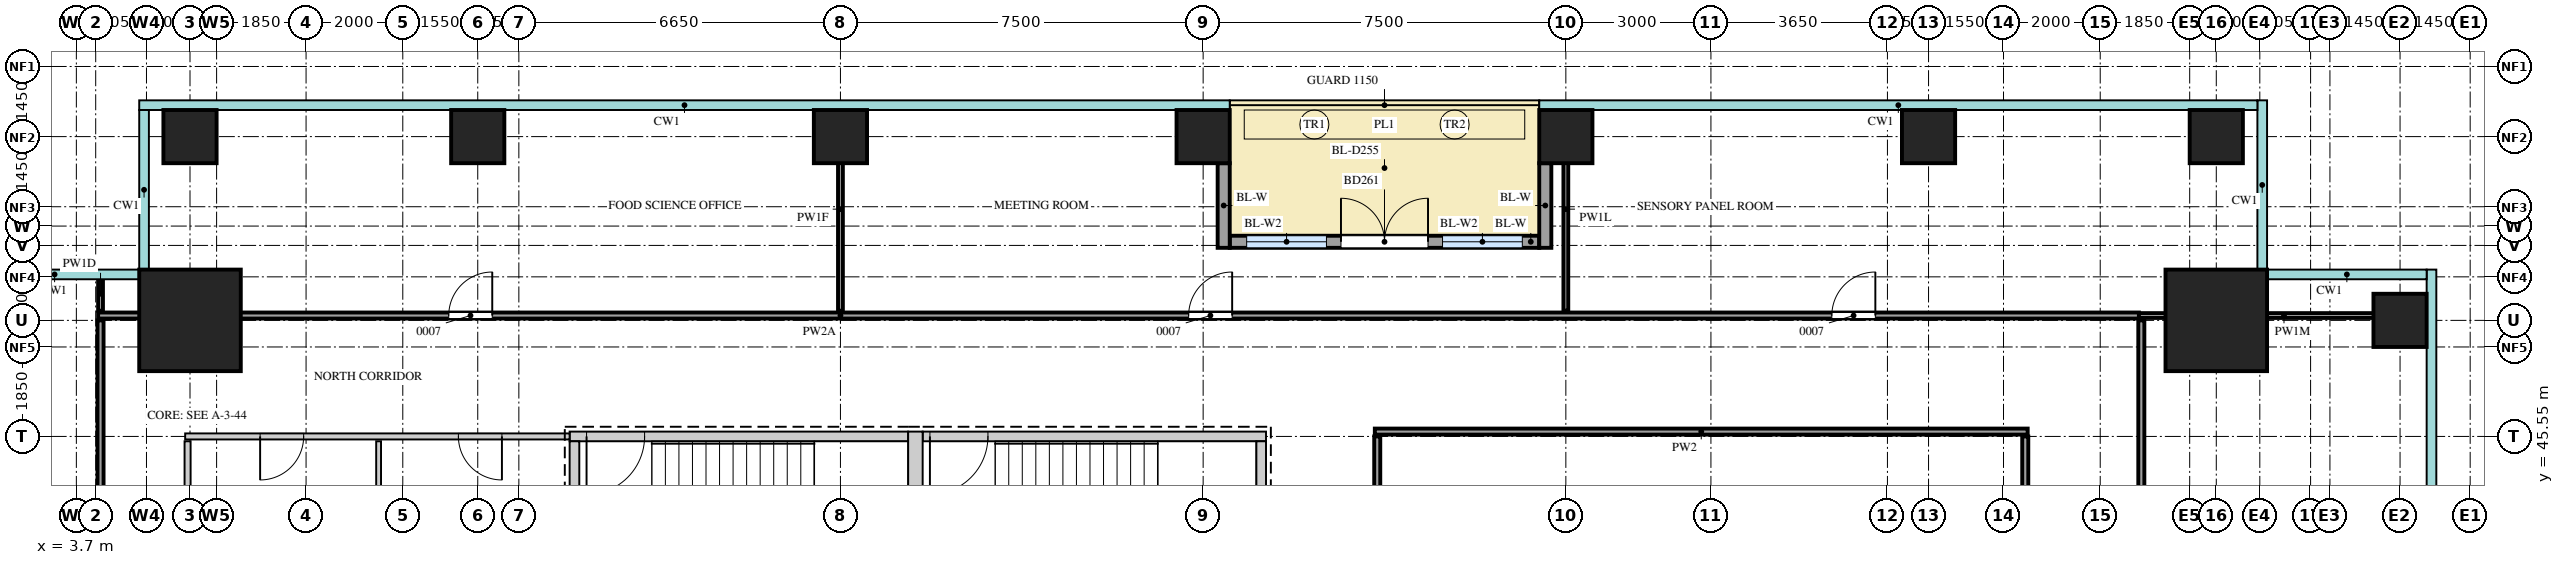
"""IFC4 building model, lengths in metres.
Left out: names, types, materials, properties, quantities, classifications, styles, units other than length and angle.
Written with IfcOpenShell. Run it as: python <this file> out.ifc"""

import sys

from ifc_helpers import new_model, si_unit, direction, frame, frame_2d, origin, origin_2d, place, context, subcontext, project, spatial, rectangle, extrude, source, transform, mapped, element, fill, save


model = new_model("IFC4")
c1 = context("Model", 3, precision=1e-05, world=origin(), true_north=direction((0.0, 1.0)))
c2 = subcontext(c1, "Body", "Model", "MODEL_VIEW")
j1 = project(units=[si_unit("LENGTHUNIT", "METRE"), si_unit("PLANEANGLEUNIT", "RADIAN")], contexts=[c1])
p1 = place(None, origin())
s1 = spatial("IfcSite", under=j1, at=p1, CompositionType="ELEMENT")
p2 = place(p1, origin())
s2 = spatial("IfcBuilding", under=s1, at=p2, CompositionType="ELEMENT")
p3 = place(p2, frame((0.0, 0.0, 123.5)))
s3 = spatial("IfcBuildingStorey", under=s2, at=p3, CompositionType="ELEMENT", Elevation=123.5)
m1 = source(origin(), c2, "Body", "SweptSolid", [
    extrude(rectangle(XDim=7.0, YDim=0.2, at=frame_2d((3.5, 0.0))), origin(), (0.0, 0.0, 1.0), 4.1),
])
p4 = place(p3, frame((13.9, 45.55, 0.0), z_axis=(0.0, 0.0, 1.0), x_axis=(1.0, 0.0, 0.0)))
e1 = element("IfcWall", 1, at=p4, inside=s3, PredefinedType="SHEAR", context=c2, shape_type="MappedRepresentation", body=[
    mapped(m1, transform((0.0, 0.0, 0.0))),
])
m2 = source(origin(), c2, "Body", "SweptSolid", [
    extrude(rectangle(XDim=1.2, YDim=2.1, at=frame_2d((0.6, 1.05))), frame((0.0, 0.11, 0.0), z_axis=(0.0, -1.0, 0.0), x_axis=(1.0, 0.0, 0.0)), (0.0, 0.0, 1.0), 0.22),
])
p5 = place(p4, frame((0.35, 0.0, 0.0)))
e2 = element("IfcOpeningElement", 2, at=p5, cuts=e1, PredefinedType="OPENING", context=c2, shape_type="MappedRepresentation", body=[
    mapped(m2, transform((0.0, 0.0, 0.0))),
])
m3 = source(origin(), c2, "Body", "SweptSolid", [
    extrude(rectangle(XDim=7.1, YDim=0.2, at=frame_2d((3.55, 0.0))), origin(), (0.0, 0.0, 1.0), 4.1),
])
p6 = place(p3, frame((21.2, 45.55, 0.0), z_axis=(0.0, 0.0, 1.0), x_axis=(1.0, 0.0, 0.0)))
e3 = element("IfcWall", 3, at=p6, inside=s3, PredefinedType="SHEAR", context=c2, shape_type="MappedRepresentation", body=[
    mapped(m3, transform((0.0, 0.0, 0.0))),
])
p7 = place(p6, frame((0.15, 0.0, 0.0)))
e4 = element("IfcOpeningElement", 4, at=p7, cuts=e3, PredefinedType="OPENING", context=c2, shape_type="MappedRepresentation", body=[
    mapped(m2, transform((0.0, 0.0, 0.0))),
])
m4 = source(origin(), c2, "Body", "SweptSolid", [
    extrude(rectangle(XDim=3.75, YDim=0.3, at=frame_2d((1.875, 0.0))), origin(), (0.0, 0.0, 1.0), 4.1),
])
p8 = place(p3, frame((21.05, 41.9, 0.0), z_axis=(0.0, 0.0, 1.0), x_axis=(0.0, 1.0, 0.0)))
e5 = element("IfcWall", 5, at=p8, inside=s3, PredefinedType="SHEAR", context=c2, shape_type="MappedRepresentation", body=[
    mapped(m4, transform((0.0, 0.0, 0.0))),
])
m5 = source(origin(), c2, "Body", "SweptSolid", [
    extrude(rectangle(XDim=3.35, YDim=0.2, at=frame_2d((1.675, 0.0))), origin(), (0.0, 0.0, 1.0), 4.1),
])
for number, where, z_axis, x_axis in (
    (6, (14.0, 42.1, 0.0), (0.0, 0.0, 1.0), (0.0, 1.0, 0.0)),
    (7, (28.2, 42.1, 0.0), (0.0, 0.0, 1.0), (0.0, 1.0, 0.0)),
):
    element("IfcWall", number, at=place(p3, frame(where, z_axis=z_axis, x_axis=x_axis)), inside=s3, PredefinedType="SHEAR", context=c2, shape_type="MappedRepresentation", body=[
        mapped(m5, transform((0.0, 0.0, 0.0))),
    ])
m6 = source(origin(), c2, "Body", "SweptSolid", [
    extrude(rectangle(XDim=2.1, YDim=2.1, at=origin_2d()), origin(), (0.0, 0.0, 1.0), 4.4),
])
for number, where, z_axis, x_axis in (
    (8, (47.95, 47.95, 0.0), (0.0, 0.0, 1.0), (1.0, 0.0, 0.0)),
    (9, (6.05, 47.95, 0.0), (0.0, 0.0, 1.0), (1.0, 0.0, 0.0)),
):
    element("IfcColumn", number, at=place(p3, frame(where, z_axis=z_axis, x_axis=x_axis)), inside=s3, PredefinedType="COLUMN", context=c2, shape_type="MappedRepresentation", body=[
        mapped(m6, transform((0.0, 0.0, 0.0))),
    ])
m7 = source(origin(), c2, "Body", "SweptSolid", [
    extrude(rectangle(XDim=1.1, YDim=1.1, at=origin_2d()), origin(), (0.0, 0.0, 1.0), 4.1),
])
for number, where, z_axis, x_axis in (
    (10, (51.75, 47.95, 0.0), (0.0, 0.0, 1.0), (1.0, 0.0, 0.0)),
    (11, (6.05, 51.75, 0.0), (0.0, 0.0, 1.0), (1.0, 0.0, 0.0)),
    (12, (12.0, 51.75, 0.0), (0.0, 0.0, 1.0), (1.0, 0.0, 0.0)),
    (13, (19.5, 51.75, 0.0), (0.0, 0.0, 1.0), (1.0, 0.0, 0.0)),
    (14, (27.0, 51.75, 0.0), (0.0, 0.0, 1.0), (1.0, 0.0, 0.0)),
    (15, (34.5, 51.75, 0.0), (0.0, 0.0, 1.0), (1.0, 0.0, 0.0)),
    (16, (42.0, 51.75, 0.0), (0.0, 0.0, 1.0), (1.0, 0.0, 0.0)),
    (17, (47.95, 51.75, 0.0), (0.0, 0.0, 1.0), (1.0, 0.0, 0.0)),
):
    element("IfcColumn", number, at=place(p3, frame(where, z_axis=z_axis, x_axis=x_axis)), inside=s3, PredefinedType="COLUMN", context=c2, shape_type="MappedRepresentation", body=[
        mapped(m7, transform((0.0, 0.0, 0.0))),
    ])
m8 = source(origin(), c2, "Body", "SweptSolid", [
    extrude(rectangle(XDim=6.4, YDim=0.25, at=frame_2d((3.2, 0.0))), origin(), (0.0, 0.0, 1.0), 4.1),
])
p9 = place(p3, frame((27.55, 49.575, 0.0), z_axis=(0.0, 0.0, 1.0), x_axis=(1.0, 0.0, 0.0)))
e18 = element("IfcWall", 18, at=p9, inside=s3, PredefinedType="SOLIDWALL", context=c2, shape_type="MappedRepresentation", body=[
    mapped(m8, transform((0.0, 0.0, 0.0))),
])
m9 = source(origin(), c2, "Body", "SweptSolid", [
    extrude(rectangle(XDim=1.65, YDim=2.4, at=frame_2d((0.825, 1.2))), frame((0.0, 0.135, 0.0), z_axis=(0.0, -1.0, 0.0), x_axis=(1.0, 0.0, 0.0)), (0.0, 0.0, 1.0), 0.27),
])
p10 = place(p9, frame((0.35, 0.0, 0.0)))
e19 = element("IfcOpeningElement", 19, at=p10, cuts=e18, PredefinedType="OPENING", context=c2, shape_type="MappedRepresentation", body=[
    mapped(m9, transform((0.0, 0.0, 0.0))),
])
p11 = place(p9, frame((4.4, 0.0, 0.0)))
e20 = element("IfcOpeningElement", 20, at=p11, cuts=e18, PredefinedType="OPENING", context=c2, shape_type="MappedRepresentation", body=[
    mapped(m9, transform((0.0, 0.0, 0.0))),
])
m10 = source(origin(), c2, "Body", "SweptSolid", [
    extrude(rectangle(XDim=1.8, YDim=2.4, at=frame_2d((0.9, 1.2))), frame((0.0, 0.135, 0.0), z_axis=(0.0, -1.0, 0.0), x_axis=(1.0, 0.0, 0.0)), (0.0, 0.0, 1.0), 0.27),
])
p12 = place(p9, frame((2.3, 0.0, 0.0)))
e21 = element("IfcOpeningElement", 21, at=p12, cuts=e18, PredefinedType="OPENING", context=c2, shape_type="MappedRepresentation", body=[
    mapped(m10, transform((0.0, 0.0, 0.0))),
])
m11 = source(origin(), c2, "Body", "SweptSolid", [
    extrude(rectangle(XDim=1.75, YDim=0.25, at=frame_2d((0.875, 0.0))), origin(), (0.0, 0.0, 1.0), 4.1),
])
for number, where, z_axis, x_axis in (
    (22, (27.425, 51.2, 0.0), (0.0, 0.0, 1.0), (0.0, -1.0, 0.0)),
    (23, (34.075, 51.2, 0.0), (0.0, 0.0, 1.0), (0.0, -1.0, 0.0)),
):
    element("IfcWall", number, at=place(p3, frame(where, z_axis=z_axis, x_axis=x_axis)), inside=s3, PredefinedType="SOLIDWALL", context=c2, shape_type="MappedRepresentation", body=[
        mapped(m11, transform((0.0, 0.0, 0.0))),
    ])
m12 = source(origin(), c2, "Body", "SweptSolid", [
    extrude(rectangle(XDim=37.65, YDim=0.125, at=frame_2d((18.825, 0.0))), origin(), (0.0, 0.0, 1.0), 4.2),
])
p13 = place(p3, frame((46.4, 10.3, 0.0), z_axis=(0.0, 0.0, 1.0), x_axis=(0.0, 1.0, 0.0)))
e24 = element("IfcWall", 24, at=p13, inside=s3, PredefinedType="PARTITIONING", context=c2, shape_type="MappedRepresentation", body=[
    mapped(m12, transform((0.0, 0.0, 0.0))),
])
m13 = source(origin(), c2, "Body", "SweptSolid", [
    extrude(rectangle(XDim=1.2, YDim=2.1, at=frame_2d((0.6, 1.05))), frame((0.0, 0.073, 0.0), z_axis=(0.0, -1.0, 0.0), x_axis=(1.0, 0.0, 0.0)), (0.0, 0.0, 1.0), 0.145),
])
p14 = place(p13, frame((11.6, 0.0, 0.0)))
e25 = element("IfcOpeningElement", 25, at=p14, cuts=e24, PredefinedType="OPENING", context=c2, shape_type="MappedRepresentation", body=[
    mapped(m13, transform((0.0, 0.0, 0.0))),
])
m14 = source(origin(), c2, "Body", "SweptSolid", [
    extrude(rectangle(XDim=0.9, YDim=2.1, at=frame_2d((0.45, 1.05))), frame((0.0, 0.073, 0.0), z_axis=(0.0, -1.0, 0.0), x_axis=(1.0, 0.0, 0.0)), (0.0, 0.0, 1.0), 0.145),
])
p15 = place(p13, frame((29.45, 0.0, 0.0)))
e26 = element("IfcOpeningElement", 26, at=p15, cuts=e24, PredefinedType="OPENING", context=c2, shape_type="MappedRepresentation", body=[
    mapped(m14, transform((0.0, 0.0, 0.0))),
])
m15 = source(origin(), c2, "Body", "SweptSolid", [
    extrude(rectangle(XDim=32.85, YDim=0.125, at=frame_2d((16.425, 0.0))), origin(), (0.0, 0.0, 1.0), 4.2),
])
p16 = place(p3, frame((44.0, 12.7, 0.0), z_axis=(0.0, 0.0, 1.0), x_axis=(0.0, 1.0, 0.0)))
e27 = element("IfcWall", 27, at=p16, inside=s3, PredefinedType="PARTITIONING", context=c2, shape_type="MappedRepresentation", body=[
    mapped(m15, transform((0.0, 0.0, 0.0))),
])
p17 = place(p16, frame((18.2, 0.0, 0.0)))
e28 = element("IfcOpeningElement", 28, at=p17, cuts=e27, PredefinedType="OPENING", context=c2, shape_type="MappedRepresentation", body=[
    mapped(m13, transform((0.0, 0.0, 0.0))),
])
p18 = place(p16, frame((27.5, 0.0, 0.0)))
e29 = element("IfcOpeningElement", 29, at=p18, cuts=e27, PredefinedType="OPENING", context=c2, shape_type="MappedRepresentation", body=[
    mapped(m13, transform((0.0, 0.0, 0.0))),
])
m16 = source(origin(), c2, "Body", "SweptSolid", [
    extrude(rectangle(XDim=28.75, YDim=0.125, at=frame_2d((14.375, 0.0))), origin(), (0.0, 0.0, 1.0), 4.2),
])
p19 = place(p3, frame((4.2, 19.2, 0.0), z_axis=(0.0, 0.0, 1.0), x_axis=(0.0, 1.0, 0.0)))
e30 = element("IfcWall", 30, at=p19, inside=s3, PredefinedType="PARTITIONING", context=c2, shape_type="MappedRepresentation", body=[
    mapped(m16, transform((0.0, 0.0, 0.0))),
])
p20 = place(p19, frame((3.45, 0.0, 0.0)))
e31 = element("IfcOpeningElement", 31, at=p20, cuts=e30, PredefinedType="OPENING", context=c2, shape_type="MappedRepresentation", body=[
    mapped(m14, transform((0.0, 0.0, 0.0))),
])
p21 = place(p19, frame((16.5, 0.0, 0.0)))
e32 = element("IfcOpeningElement", 32, at=p21, cuts=e30, PredefinedType="OPENING", context=c2, shape_type="MappedRepresentation", body=[
    mapped(m14, transform((0.0, 0.0, 0.0))),
])
m17 = source(origin(), c2, "Body", "SweptSolid", [
    extrude(rectangle(XDim=9.45, YDim=0.125, at=frame_2d((4.725, 0.0))), origin(), (0.0, 0.0, 1.0), 4.2),
])
p22 = place(p3, frame((30.6, 36.1, 0.0), z_axis=(0.0, 0.0, 1.0), x_axis=(0.0, 1.0, 0.0)))
e33 = element("IfcWall", 33, at=p22, inside=s3, PredefinedType="PARTITIONING", context=c2, shape_type="MappedRepresentation", body=[
    mapped(m17, transform((0.0, 0.0, 0.0))),
])
m18 = source(origin(), c2, "Body", "SweptSolid", [
    extrude(rectangle(XDim=3.45, YDim=0.125, at=frame_2d((1.725, 0.0))), origin(), (0.0, 0.0, 1.0), 4.2),
])
p23 = place(p3, frame((6.0, 42.0, 0.0), z_axis=(0.0, 0.0, 1.0), x_axis=(0.0, 1.0, 0.0)))
e34 = element("IfcWall", 34, at=p23, inside=s3, PredefinedType="PARTITIONING", context=c2, shape_type="MappedRepresentation", body=[
    mapped(m18, transform((0.0, 0.0, 0.0))),
])
m19 = source(origin(), c2, "Body", "SweptSolid", [
    extrude(rectangle(XDim=3.45, YDim=0.1, at=frame_2d((1.725, 0.0))), origin(), (0.0, 0.0, 1.0), 4.2),
])
p24 = place(p3, frame((9.95, 42.0, 0.0), z_axis=(0.0, 0.0, 1.0), x_axis=(0.0, 1.0, 0.0)))
e35 = element("IfcWall", 35, at=p24, inside=s3, PredefinedType="PARTITIONING", context=c2, shape_type="MappedRepresentation", body=[
    mapped(m19, transform((0.0, 0.0, 0.0))),
])
m20 = source(origin(), c2, "Body", "SweptSolid", [
    extrude(rectangle(XDim=7.95, YDim=0.125, at=frame_2d((3.975, 0.0))), origin(), (0.0, 0.0, 1.0), 4.2),
])
p25 = place(p3, frame((5.95, 45.55, 0.0), z_axis=(0.0, 0.0, 1.0), x_axis=(1.0, 0.0, 0.0)))
e36 = element("IfcWall", 36, at=p25, inside=s3, PredefinedType="PARTITIONING", context=c2, shape_type="MappedRepresentation", body=[
    mapped(m20, transform((0.0, 0.0, 0.0))),
])
p26 = place(p25, frame((1.55, 0.0, 0.0)))
e37 = element("IfcOpeningElement", 37, at=p26, cuts=e36, PredefinedType="OPENING", context=c2, shape_type="MappedRepresentation", body=[
    mapped(m14, transform((0.0, 0.0, 0.0))),
])
p27 = place(p25, frame((5.65, 0.0, 0.0)))
e38 = element("IfcOpeningElement", 38, at=p27, cuts=e36, PredefinedType="OPENING", context=c2, shape_type="MappedRepresentation", body=[
    mapped(m14, transform((0.0, 0.0, 0.0))),
])
m21 = source(origin(), c2, "Body", "SweptSolid", [
    extrude(rectangle(XDim=13.5, YDim=0.125, at=frame_2d((6.75, 0.0))), origin(), (0.0, 0.0, 1.0), 4.2),
])
p28 = place(p3, frame((30.55, 45.65, 0.0), z_axis=(0.0, 0.0, 1.0), x_axis=(1.0, 0.0, 0.0)))
e39 = element("IfcWall", 39, at=p28, inside=s3, PredefinedType="PARTITIONING", context=c2, shape_type="MappedRepresentation", body=[
    mapped(m21, transform((0.0, 0.0, 0.0))),
])
m22 = source(origin(), c2, "Body", "SweptSolid", [
    extrude(rectangle(XDim=42.2, YDim=0.125, at=frame_2d((21.1, 0.0))), origin(), (0.0, 0.0, 1.0), 3.55),
])
p29 = place(p3, frame((4.15, 48.05, 0.0), z_axis=(0.0, 0.0, 1.0), x_axis=(1.0, 0.0, 0.0)))
e40 = element("IfcWall", 40, at=p29, inside=s3, PredefinedType="PARTITIONING", context=c2, shape_type="MappedRepresentation", body=[
    mapped(m22, transform((0.0, 0.0, 0.0))),
])
p30 = place(p29, frame((7.25, 0.0, 0.0)))
e41 = element("IfcOpeningElement", 41, at=p30, cuts=e40, PredefinedType="OPENING", context=c2, shape_type="MappedRepresentation", body=[
    mapped(m14, transform((0.0, 0.0, 0.0))),
])
p31 = place(p29, frame((22.55, 0.0, 0.0)))
e42 = element("IfcOpeningElement", 42, at=p31, cuts=e40, PredefinedType="OPENING", context=c2, shape_type="MappedRepresentation", body=[
    mapped(m14, transform((0.0, 0.0, 0.0))),
])
p32 = place(p29, frame((35.85, 0.0, 0.0)))
e43 = element("IfcOpeningElement", 43, at=p32, cuts=e40, PredefinedType="OPENING", context=c2, shape_type="MappedRepresentation", body=[
    mapped(m14, transform((0.0, 0.0, 0.0))),
])
m23 = source(origin(), c2, "Body", "SweptSolid", [
    extrude(rectangle(XDim=6.0, YDim=0.1, at=frame_2d((3.0, 0.0))), origin(), (0.0, 0.0, 1.0), 3.55),
])
p33 = place(p3, frame((46.35, 48.05, 0.0), z_axis=(0.0, 0.0, 1.0), x_axis=(1.0, 0.0, 0.0)))
e44 = element("IfcWall", 44, at=p33, inside=s3, PredefinedType="PARTITIONING", context=c2, shape_type="MappedRepresentation", body=[
    mapped(m23, transform((0.0, 0.0, 0.0))),
])
m24 = source(origin(), c2, "Body", "SweptSolid", [
    extrude(rectangle(XDim=0.7, YDim=0.1, at=frame_2d((0.35, 0.0))), origin(), (0.0, 0.0, 1.0), 4.2),
])
p34 = place(p3, frame((4.2, 48.15, 0.0), z_axis=(0.0, 0.0, 1.0), x_axis=(0.0, 1.0, 0.0)))
e45 = element("IfcWall", 45, at=p34, inside=s3, PredefinedType="PARTITIONING", context=c2, shape_type="MappedRepresentation", body=[
    mapped(m24, transform((0.0, 0.0, 0.0))),
])
m25 = source(origin(), c2, "Body", "SweptSolid", [
    extrude(rectangle(XDim=4.2, YDim=0.1, at=frame_2d((2.1, 0.0))), origin(), (0.0, 0.0, 1.0), 3.77),
])
p35 = place(p3, frame((19.5, 48.15, 0.0), z_axis=(0.0, 0.0, 1.0), x_axis=(0.0, 1.0, 0.0)))
e46 = element("IfcWall", 46, at=p35, inside=s3, PredefinedType="PARTITIONING", context=c2, shape_type="MappedRepresentation", body=[
    mapped(m25, transform((0.0, 0.0, 0.0))),
])
m26 = source(origin(), c2, "Body", "SweptSolid", [
    extrude(rectangle(XDim=4.2, YDim=0.1, at=frame_2d((2.1, 0.0))), origin(), (0.0, 0.0, 1.0), 3.6),
])
p36 = place(p3, frame((34.5, 48.15, 0.0), z_axis=(0.0, 0.0, 1.0), x_axis=(0.0, 1.0, 0.0)))
e47 = element("IfcWall", 47, at=p36, inside=s3, PredefinedType="PARTITIONING", context=c2, shape_type="MappedRepresentation", body=[
    mapped(m26, transform((0.0, 0.0, 0.0))),
])
m27 = source(origin(), c2, "Body", "SweptSolid", [
    extrude(rectangle(XDim=1.65, YDim=2.4, at=frame_2d((0.825, 1.2))), frame((0.0, 0.03, 0.0), z_axis=(0.0, -1.0, 0.0), x_axis=(1.0, 0.0, 0.0)), (0.0, 0.0, 1.0), 0.06),
])
p37 = place(p10, origin())
e48 = element("IfcWindow", 48, at=p37, inside=s3, PartitioningType="SINGLE_PANEL", PredefinedType="WINDOW", context=c2, shape_type="MappedRepresentation", body=[
    mapped(m27, transform((0.0, 0.0, 0.0))),
])
fill(e19, e48)
p38 = place(p11, origin())
e49 = element("IfcWindow", 49, at=p38, inside=s3, PartitioningType="SINGLE_PANEL", PredefinedType="WINDOW", context=c2, shape_type="MappedRepresentation", body=[
    mapped(m27, transform((0.0, 0.0, 0.0))),
])
fill(e20, e49)
m28 = source(origin(), c2, "Body", "SweptSolid", [
    extrude(rectangle(XDim=1.8, YDim=2.4, at=frame_2d((0.9, 1.2))), frame((0.0, 0.025, 0.0), z_axis=(0.0, -1.0, 0.0), x_axis=(1.0, 0.0, 0.0)), (0.0, 0.0, 1.0), 0.05),
])
p39 = place(p12, origin())
e50 = element("IfcDoor", 50, at=p39, inside=s3, OperationType="DOUBLE_DOOR_DOUBLE_SWING", PredefinedType="DOOR", context=c2, shape_type="MappedRepresentation", body=[
    mapped(m28, transform((0.0, 0.0, 0.0))),
])
fill(e21, e50)
m29 = source(origin(), c2, "Body", "SweptSolid", [
    extrude(rectangle(XDim=0.9, YDim=2.1, at=frame_2d((0.45, 1.05))), frame((0.0, 0.025, 0.0), z_axis=(0.0, -1.0, 0.0), x_axis=(1.0, 0.0, 0.0)), (0.0, 0.0, 1.0), 0.05),
])
p40 = place(p30, origin())
e51 = element("IfcDoor", 51, at=p40, inside=s3, OperationType="SINGLE_SWING_LEFT", PredefinedType="DOOR", context=c2, shape_type="MappedRepresentation", body=[
    mapped(m29, transform((0.0, 0.0, 0.0))),
])
fill(e41, e51)
p41 = place(p31, origin())
e52 = element("IfcDoor", 52, at=p41, inside=s3, OperationType="SINGLE_SWING_LEFT", PredefinedType="DOOR", context=c2, shape_type="MappedRepresentation", body=[
    mapped(m29, transform((0.0, 0.0, 0.0))),
])
fill(e42, e52)
p42 = place(p32, origin())
e53 = element("IfcDoor", 53, at=p42, inside=s3, OperationType="SINGLE_SWING_LEFT", PredefinedType="DOOR", context=c2, shape_type="MappedRepresentation", body=[
    mapped(m29, transform((0.0, 0.0, 0.0))),
])
fill(e43, e53)
p43 = place(p26, origin())
e54 = element("IfcDoor", 54, at=p43, inside=s3, OperationType="SINGLE_SWING_LEFT", PredefinedType="DOOR", context=c2, shape_type="MappedRepresentation", body=[
    mapped(m29, transform((0.0, 0.0, 0.0))),
])
fill(e37, e54)
p44 = place(p27, origin())
e55 = element("IfcDoor", 55, at=p44, inside=s3, OperationType="SINGLE_SWING_RIGHT", PredefinedType="DOOR", context=c2, shape_type="MappedRepresentation", body=[
    mapped(m29, transform((0.0, 0.0, 0.0))),
])
fill(e38, e55)
m30 = source(origin(), c2, "Body", "SweptSolid", [
    extrude(rectangle(XDim=1.2, YDim=2.1, at=frame_2d((0.6, 1.05))), frame((0.0, 0.025, 0.0), z_axis=(0.0, -1.0, 0.0), x_axis=(1.0, 0.0, 0.0)), (0.0, 0.0, 1.0), 0.05),
])
p45 = place(p5, origin())
e56 = element("IfcDoor", 56, at=p45, inside=s3, OperationType="SINGLE_SWING_LEFT", PredefinedType="DOOR", context=c2, shape_type="MappedRepresentation", body=[
    mapped(m30, transform((0.0, 0.0, 0.0))),
])
fill(e2, e56)
p46 = place(p7, origin())
e57 = element("IfcDoor", 57, at=p46, inside=s3, OperationType="SINGLE_SWING_LEFT", PredefinedType="DOOR", context=c2, shape_type="MappedRepresentation", body=[
    mapped(m30, transform((0.0, 0.0, 0.0))),
])
fill(e4, e57)
save(model, sys.argv[1])
